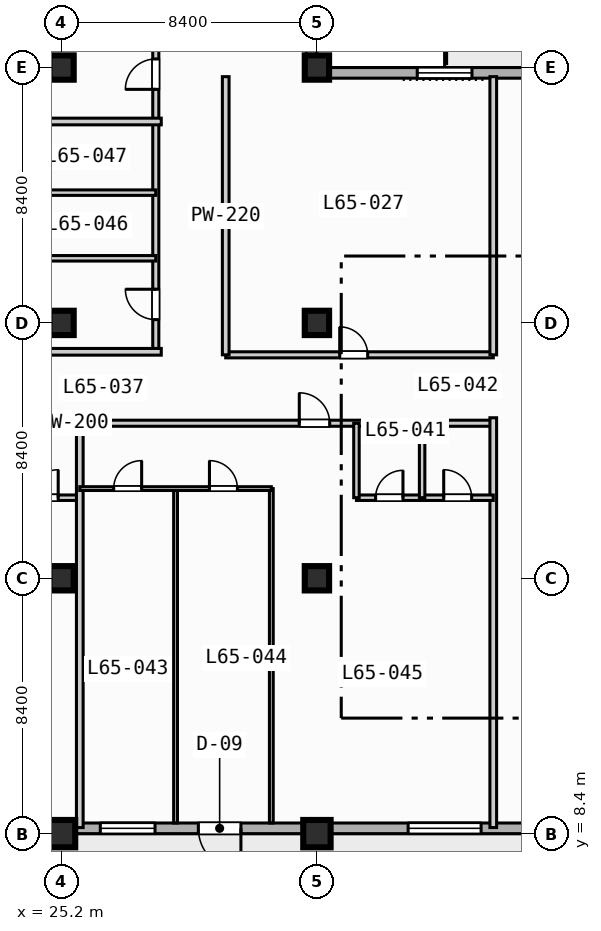
"""IFC4 building model, lengths in metres.
Left out: names, types, materials, properties, quantities, classifications, styles, units other than length and angle.
Written with IfcOpenShell. Run it as: python <this file> out.ifc"""

import sys

from ifc_helpers import new_model, si_unit, direction, frame, frame_2d, origin, origin_2d, place, context, subcontext, project, spatial, rectangle, extrude, element, fill, save


model = new_model("IFC4")
c1 = context("Model", 3, precision=1e-05, world=origin(), true_north=direction((0.0, 1.0)))
c2 = subcontext(c1, "Body", "Model", "MODEL_VIEW")
j1 = project(units=[si_unit("LENGTHUNIT", "METRE"), si_unit("PLANEANGLEUNIT", "RADIAN")], contexts=[c1])
p1 = place(None, origin())
s1 = spatial("IfcSite", under=j1, at=p1, CompositionType="ELEMENT")
p2 = place(p1, origin())
s2 = spatial("IfcBuilding", under=s1, at=p2, CompositionType="ELEMENT")
p3 = place(p2, frame((0.0, 0.0, 263.8)))
s3 = spatial("IfcBuildingStorey", under=s2, at=p3, CompositionType="ELEMENT", Elevation=263.8)
p4 = place(p3, frame((25.2, 8.4, 0.0), z_axis=(0.0, 0.0, 1.0), x_axis=(1.0, 0.0, 0.0)))
e1 = element("IfcColumn", 1, at=p4, inside=s3, PredefinedType="COLUMN", context=c2, shape_type="SweptSolid", body=[
    extrude(rectangle(XDim=0.9, YDim=0.9, at=origin_2d()), origin(), (0.0, 0.0, 1.0), 3.7),
])
for number, where, z_axis, x_axis in (
    (2, (25.2, 16.8, 0.0), (0.0, 0.0, 1.0), (1.0, 0.0, 0.0)),
    (3, (25.2, 25.2, 0.0), (0.0, 0.0, 1.0), (1.0, 0.0, 0.0)),
    (4, (25.2, 33.6, 0.0), (0.0, 0.0, 1.0), (1.0, 0.0, 0.0)),
):
    element("IfcColumn", number, at=place(p3, frame(where, z_axis=z_axis, x_axis=x_axis)), inside=s3, PredefinedType="COLUMN", context=c2, shape_type="SweptSolid", body=[
        extrude(rectangle(XDim=0.8, YDim=0.8, at=origin_2d()), origin(), (0.0, 0.0, 1.0), 3.7),
    ])
p5 = place(p3, frame((33.6, 8.4, 0.0), z_axis=(0.0, 0.0, 1.0), x_axis=(1.0, 0.0, 0.0)))
e5 = element("IfcColumn", 5, at=p5, inside=s3, PredefinedType="COLUMN", context=c2, shape_type="SweptSolid", body=[
    extrude(rectangle(XDim=0.9, YDim=0.9, at=origin_2d()), origin(), (0.0, 0.0, 1.0), 3.7),
])
for number, where, z_axis, x_axis in (
    (6, (33.6, 16.8, 0.0), (0.0, 0.0, 1.0), (1.0, 0.0, 0.0)),
    (7, (33.6, 25.2, 0.0), (0.0, 0.0, 1.0), (1.0, 0.0, 0.0)),
    (8, (33.6, 33.6, 0.0), (0.0, 0.0, 1.0), (1.0, 0.0, 0.0)),
):
    element("IfcColumn", number, at=place(p3, frame(where, z_axis=z_axis, x_axis=x_axis)), inside=s3, PredefinedType="COLUMN", context=c2, shape_type="SweptSolid", body=[
        extrude(rectangle(XDim=0.8, YDim=0.8, at=origin_2d()), origin(), (0.0, 0.0, 1.0), 3.7),
    ])
p6 = place(p3, frame((33.425, 72.425, 0.0), z_axis=(0.0, 0.0, 1.0), x_axis=(0.0, -1.0, 0.0)))
e9 = element("IfcWall", 9, at=p6, inside=s3, PredefinedType="STANDARD", context=c2, shape_type="SweptSolid", body=[
    extrude(rectangle(XDim=39.0, YDim=0.35, at=frame_2d((19.5, 0.0))), origin(), (0.0, 0.0, 1.0), 3.47),
])
p7 = place(p6, frame((5.9, 0.0, 0.85)))
e10 = element("IfcOpeningElement", 10, at=p7, cuts=e9, PredefinedType="OPENING", context=c2, shape_type="SweptSolid", body=[
    extrude(rectangle(XDim=1.8, YDim=1.8, at=frame_2d((0.9, 0.9))), frame((0.0, 0.185, 0.0), z_axis=(0.0, -1.0, 0.0), x_axis=(1.0, 0.0, 0.0)), (0.0, 0.0, 1.0), 0.37),
])
p8 = place(p3, frame((33.425, 33.425, 0.0), z_axis=(0.0, 0.0, 1.0), x_axis=(1.0, 0.0, 0.0)))
e11 = element("IfcWall", 11, at=p8, inside=s3, PredefinedType="STANDARD", context=c2, shape_type="SweptSolid", body=[
    extrude(rectangle(XDim=39.0, YDim=0.35, at=frame_2d((19.5, 0.0))), origin(), (0.0, 0.0, 1.0), 3.47),
])
p9 = place(p8, frame((12.075, 0.0, 0.0)))
e12 = element("IfcOpeningElement", 12, at=p9, cuts=e11, PredefinedType="OPENING", context=c2, shape_type="SweptSolid", body=[
    extrude(rectangle(XDim=1.4, YDim=2.2, at=frame_2d((0.7, 1.1))), frame((0.0, 0.185, 0.0), z_axis=(0.0, -1.0, 0.0), x_axis=(1.0, 0.0, 0.0)), (0.0, 0.0, 1.0), 0.37),
])
p10 = place(p8, frame((3.475, 0.0, 0.85)))
e13 = element("IfcOpeningElement", 13, at=p10, cuts=e11, PredefinedType="OPENING", context=c2, shape_type="SweptSolid", body=[
    extrude(rectangle(XDim=1.8, YDim=1.8, at=frame_2d((0.9, 0.9))), frame((0.0, 0.185, 0.0), z_axis=(0.0, -1.0, 0.0), x_axis=(1.0, 0.0, 0.0)), (0.0, 0.0, 1.0), 0.37),
])
p11 = place(p3, frame((72.425, 8.575, 0.0), z_axis=(0.0, 0.0, 1.0), x_axis=(-1.0, 0.0, 0.0)))
e14 = element("IfcWall", 14, at=p11, inside=s3, PredefinedType="STANDARD", context=c2, shape_type="SweptSolid", body=[
    extrude(rectangle(XDim=60.85, YDim=0.35, at=frame_2d((30.425, 0.0))), origin(), (0.0, 0.0, 1.0), 3.47),
])
p12 = place(p11, frame((41.325, 0.0, 0.0)))
e15 = element("IfcOpeningElement", 15, at=p12, cuts=e14, PredefinedType="OPENING", context=c2, shape_type="SweptSolid", body=[
    extrude(rectangle(XDim=1.4, YDim=2.2, at=frame_2d((0.7, 1.1))), frame((0.0, 0.185, 0.0), z_axis=(0.0, -1.0, 0.0), x_axis=(1.0, 0.0, 0.0)), (0.0, 0.0, 1.0), 0.37),
])
p13 = place(p11, frame((50.225, 0.0, 0.85)))
e16 = element("IfcOpeningElement", 16, at=p13, cuts=e14, PredefinedType="OPENING", context=c2, shape_type="SweptSolid", body=[
    extrude(rectangle(XDim=2.4, YDim=1.95, at=frame_2d((1.2, 0.975))), frame((0.0, 0.185, 0.0), z_axis=(0.0, -1.0, 0.0), x_axis=(1.0, 0.0, 0.0)), (0.0, 0.0, 1.0), 0.37),
])
p14 = place(p11, frame((33.425, 0.0, 0.85)))
e17 = element("IfcOpeningElement", 17, at=p14, cuts=e14, PredefinedType="OPENING", context=c2, shape_type="SweptSolid", body=[
    extrude(rectangle(XDim=2.4, YDim=1.95, at=frame_2d((1.2, 0.975))), frame((0.0, 0.185, 0.0), z_axis=(0.0, -1.0, 0.0), x_axis=(1.0, 0.0, 0.0)), (0.0, 0.0, 1.0), 0.37),
])
p15 = place(p11, frame((25.325, 0.0, 0.85)))
e18 = element("IfcOpeningElement", 18, at=p15, cuts=e14, PredefinedType="OPENING", context=c2, shape_type="SweptSolid", body=[
    extrude(rectangle(XDim=1.8, YDim=1.8, at=frame_2d((0.9, 0.9))), frame((0.0, 0.185, 0.0), z_axis=(0.0, -1.0, 0.0), x_axis=(1.0, 0.0, 0.0)), (0.0, 0.0, 1.0), 0.37),
])
p16 = place(p11, frame((58.15, 0.0, 0.85)))
e19 = element("IfcOpeningElement", 19, at=p16, cuts=e14, PredefinedType="OPENING", context=c2, shape_type="SweptSolid", body=[
    extrude(rectangle(XDim=1.8, YDim=1.8, at=frame_2d((0.9, 0.9))), frame((0.0, 0.185, 0.0), z_axis=(0.0, -1.0, 0.0), x_axis=(1.0, 0.0, 0.0)), (0.0, 0.0, 1.0), 0.37),
])
p17 = place(p11, frame((56.29, 0.0, 0.85)))
e20 = element("IfcOpeningElement", 20, at=p17, cuts=e14, PredefinedType="OPENING", context=c2, shape_type="SweptSolid", body=[
    extrude(rectangle(XDim=0.72, YDim=1.8, at=frame_2d((0.36, 0.9))), frame((0.0, 0.185, 0.0), z_axis=(0.0, -1.0, 0.0), x_axis=(1.0, 0.0, 0.0)), (0.0, 0.0, 1.0), 0.37),
])
p18 = place(p11, frame((44.15, 0.0, 0.85)))
e21 = element("IfcOpeningElement", 21, at=p18, cuts=e14, PredefinedType="OPENING", context=c2, shape_type="SweptSolid", body=[
    extrude(rectangle(XDim=1.8, YDim=1.8, at=frame_2d((0.9, 0.9))), frame((0.0, 0.185, 0.0), z_axis=(0.0, -1.0, 0.0), x_axis=(1.0, 0.0, 0.0)), (0.0, 0.0, 1.0), 0.37),
])
p19 = place(p3, frame((30.6, 24.15, 0.0), z_axis=(0.0, 0.0, 1.0), x_axis=(1.0, 0.0, 0.0)))
e22 = element("IfcWall", 22, at=p19, inside=s3, PredefinedType="PARTITIONING", context=c2, shape_type="SweptSolid", body=[
    extrude(rectangle(XDim=8.8, YDim=0.2, at=frame_2d((4.4, 0.0))), origin(), (0.0, 0.0, 1.0), 3.47),
])
p20 = place(p19, frame((3.75, 0.0, 0.0)))
e23 = element("IfcOpeningElement", 23, at=p20, cuts=e22, PredefinedType="OPENING", context=c2, shape_type="SweptSolid", body=[
    extrude(rectangle(XDim=0.92, YDim=2.1, at=frame_2d((0.46, 1.05))), frame((0.0, 0.11, 0.0), z_axis=(0.0, -1.0, 0.0), x_axis=(1.0, 0.0, 0.0)), (0.0, 0.0, 1.0), 0.22),
])
for number, where, z_axis, x_axis in (
    (24, (30.6, 24.15, 0.0), (0.0, 0.0, 1.0), (0.0, 1.0, 0.0)),
    (25, (39.4, 24.15, 0.0), (0.0, 0.0, 1.0), (0.0, 1.0, 0.0)),
):
    element("IfcWall", number, at=place(p3, frame(where, z_axis=z_axis, x_axis=x_axis)), inside=s3, PredefinedType="PARTITIONING", context=c2, shape_type="SweptSolid", body=[
        extrude(rectangle(XDim=9.15, YDim=0.22, at=frame_2d((4.575, 0.0))), origin(), (0.0, 0.0, 1.0), 3.47),
    ])
p21 = place(p3, frame((11.8, 21.9, 0.0), z_axis=(0.0, 0.0, 1.0), x_axis=(1.0, 0.0, 0.0)))
e26 = element("IfcWall", 26, at=p21, inside=s3, PredefinedType="PARTITIONING", context=c2, shape_type="SweptSolid", body=[
    extrude(rectangle(XDim=27.6, YDim=0.2, at=frame_2d((13.8, 0.0))), origin(), (0.0, 0.0, 1.0), 3.47),
])
p22 = place(p21, frame((7.42, 0.0, 0.0)))
e27 = element("IfcOpeningElement", 27, at=p22, cuts=e26, PredefinedType="OPENING", context=c2, shape_type="SweptSolid", body=[
    extrude(rectangle(XDim=1.0, YDim=2.15, at=frame_2d((0.5, 1.075))), frame((0.0, 0.11, 0.0), z_axis=(0.0, -1.0, 0.0), x_axis=(1.0, 0.0, 0.0)), (0.0, 0.0, 1.0), 0.22),
])
p23 = place(p21, frame((21.22, 0.0, 0.0)))
e28 = element("IfcOpeningElement", 28, at=p23, cuts=e26, PredefinedType="OPENING", context=c2, shape_type="SweptSolid", body=[
    extrude(rectangle(XDim=1.0, YDim=2.15, at=frame_2d((0.5, 1.075))), frame((0.0, 0.11, 0.0), z_axis=(0.0, -1.0, 0.0), x_axis=(1.0, 0.0, 0.0)), (0.0, 0.0, 1.0), 0.22),
])
p24 = place(p3, frame((21.3, 19.45, 0.0), z_axis=(0.0, 0.0, 1.0), x_axis=(1.0, 0.0, 0.0)))
e29 = element("IfcWall", 29, at=p24, inside=s3, PredefinedType="PLUMBINGWALL", context=c2, shape_type="SweptSolid", body=[
    extrude(rectangle(XDim=4.5, YDim=0.18, at=frame_2d((2.25, 0.0))), origin(), (0.0, 0.0, 1.0), 3.47),
])
p25 = place(p24, frame((0.63, 0.0, 0.0)))
e30 = element("IfcOpeningElement", 30, at=p25, cuts=e29, PredefinedType="OPENING", context=c2, shape_type="SweptSolid", body=[
    extrude(rectangle(XDim=0.9, YDim=2.1, at=frame_2d((0.45, 1.05))), frame((0.0, 0.1, 0.0), z_axis=(0.0, -1.0, 0.0), x_axis=(1.0, 0.0, 0.0)), (0.0, 0.0, 1.0), 0.2),
])
p26 = place(p24, frame((2.87, 0.0, 0.0)))
e31 = element("IfcOpeningElement", 31, at=p26, cuts=e29, PredefinedType="OPENING", context=c2, shape_type="SweptSolid", body=[
    extrude(rectangle(XDim=0.92, YDim=2.1, at=frame_2d((0.46, 1.05))), frame((0.0, 0.1, 0.0), z_axis=(0.0, -1.0, 0.0), x_axis=(1.0, 0.0, 0.0)), (0.0, 0.0, 1.0), 0.2),
])
for number, where, z_axis, x_axis in (
    (32, (25.8, 8.6, 0.0), (0.0, 0.0, 1.0), (0.0, 1.0, 0.0)),
    (33, (39.4, 8.6, 0.0), (0.0, 0.0, 1.0), (0.0, 1.0, 0.0)),
):
    element("IfcWall", number, at=place(p3, frame(where, z_axis=z_axis, x_axis=x_axis)), inside=s3, PredefinedType="PARTITIONING", context=c2, shape_type="SweptSolid", body=[
        extrude(rectangle(XDim=13.48, YDim=0.22, at=frame_2d((6.74, 0.0))), origin(), (0.0, 0.0, 1.0), 3.47),
    ])
p27 = place(p3, frame((34.9, 19.45, 0.0), z_axis=(0.0, 0.0, 1.0), x_axis=(1.0, 0.0, 0.0)))
e34 = element("IfcWall", 34, at=p27, inside=s3, PredefinedType="PLUMBINGWALL", context=c2, shape_type="SweptSolid", body=[
    extrude(rectangle(XDim=4.5, YDim=0.18, at=frame_2d((2.25, 0.0))), origin(), (0.0, 0.0, 1.0), 3.47),
])
p28 = place(p27, frame((0.63, 0.0, 0.0)))
e35 = element("IfcOpeningElement", 35, at=p28, cuts=e34, PredefinedType="OPENING", context=c2, shape_type="SweptSolid", body=[
    extrude(rectangle(XDim=0.9, YDim=2.1, at=frame_2d((0.45, 1.05))), frame((0.0, 0.1, 0.0), z_axis=(0.0, -1.0, 0.0), x_axis=(1.0, 0.0, 0.0)), (0.0, 0.0, 1.0), 0.2),
])
p29 = place(p27, frame((2.87, 0.0, 0.0)))
e36 = element("IfcOpeningElement", 36, at=p29, cuts=e34, PredefinedType="OPENING", context=c2, shape_type="SweptSolid", body=[
    extrude(rectangle(XDim=0.92, YDim=2.1, at=frame_2d((0.46, 1.05))), frame((0.0, 0.1, 0.0), z_axis=(0.0, -1.0, 0.0), x_axis=(1.0, 0.0, 0.0)), (0.0, 0.0, 1.0), 0.2),
])
for number, where, z_axis, x_axis in (
    (37, (34.9, 19.45, 0.0), (0.0, 0.0, 1.0), (0.0, 1.0, 0.0)),
    (38, (37.06, 19.45, 0.0), (0.0, 0.0, 1.0), (0.0, 1.0, 0.0)),
):
    element("IfcWall", number, at=place(p3, frame(where, z_axis=z_axis, x_axis=x_axis)), inside=s3, PredefinedType="PLUMBINGWALL", context=c2, shape_type="SweptSolid", body=[
        extrude(rectangle(XDim=2.45, YDim=0.18, at=frame_2d((1.225, 0.0))), origin(), (0.0, 0.0, 1.0), 3.47),
    ])
for number, where, z_axis, x_axis in (
    (39, (28.95, 8.75, 0.0), (0.0, 0.0, 1.0), (0.0, 1.0, 0.0)),
    (40, (32.1, 8.75, 0.0), (0.0, 0.0, 1.0), (0.0, 1.0, 0.0)),
):
    element("IfcWall", number, at=place(p3, frame(where, z_axis=z_axis, x_axis=x_axis)), inside=s3, PredefinedType="PARTITIONING", context=c2, shape_type="SweptSolid", body=[
        extrude(rectangle(XDim=11.0, YDim=0.125, at=frame_2d((5.5, 0.0))), origin(), (0.0, 0.0, 1.0), 3.47),
    ])
p30 = place(p3, frame((25.8, 19.75, 0.0), z_axis=(0.0, 0.0, 1.0), x_axis=(1.0, 0.0, 0.0)))
e41 = element("IfcWall", 41, at=p30, inside=s3, PredefinedType="PARTITIONING", context=c2, shape_type="SweptSolid", body=[
    extrude(rectangle(XDim=6.3, YDim=0.125, at=frame_2d((3.15, 0.0))), origin(), (0.0, 0.0, 1.0), 3.47),
])
p31 = place(p30, frame((1.115, 0.0, 0.0)))
e42 = element("IfcOpeningElement", 42, at=p31, cuts=e41, PredefinedType="OPENING", context=c2, shape_type="SweptSolid", body=[
    extrude(rectangle(XDim=0.92, YDim=2.1, at=frame_2d((0.46, 1.05))), frame((0.0, 0.073, 0.0), z_axis=(0.0, -1.0, 0.0), x_axis=(1.0, 0.0, 0.0)), (0.0, 0.0, 1.0), 0.145),
])
p32 = place(p30, frame((4.265, 0.0, 0.0)))
e43 = element("IfcOpeningElement", 43, at=p32, cuts=e41, PredefinedType="OPENING", context=c2, shape_type="SweptSolid", body=[
    extrude(rectangle(XDim=0.92, YDim=2.1, at=frame_2d((0.46, 1.05))), frame((0.0, 0.073, 0.0), z_axis=(0.0, -1.0, 0.0), x_axis=(1.0, 0.0, 0.0)), (0.0, 0.0, 1.0), 0.145),
])
p33 = place(p3, frame((28.3, 24.25, 0.0), z_axis=(0.0, 0.0, 1.0), x_axis=(0.0, 1.0, 0.0)))
e44 = element("IfcWall", 44, at=p33, inside=s3, PredefinedType="PARTITIONING", context=c2, shape_type="SweptSolid", body=[
    extrude(rectangle(XDim=15.15, YDim=0.2, at=frame_2d((7.575, 0.0))), origin(), (0.0, 0.0, 1.0), 3.47),
])
p34 = place(p33, frame((1.058, 0.0, 0.0)))
e45 = element("IfcOpeningElement", 45, at=p34, cuts=e44, PredefinedType="OPENING", context=c2, shape_type="SweptSolid", body=[
    extrude(rectangle(XDim=1.0, YDim=2.15, at=frame_2d((0.5, 1.075))), frame((0.0, 0.11, 0.0), z_axis=(0.0, -1.0, 0.0), x_axis=(1.0, 0.0, 0.0)), (0.0, 0.0, 1.0), 0.22),
])
p35 = place(p33, frame((8.633, 0.0, 0.0)))
e46 = element("IfcOpeningElement", 46, at=p35, cuts=e44, PredefinedType="OPENING", context=c2, shape_type="SweptSolid", body=[
    extrude(rectangle(XDim=1.0, YDim=2.15, at=frame_2d((0.5, 1.075))), frame((0.0, 0.11, 0.0), z_axis=(0.0, -1.0, 0.0), x_axis=(1.0, 0.0, 0.0)), (0.0, 0.0, 1.0), 0.22),
])
p36 = place(p3, frame((8.6, 24.25, 0.0), z_axis=(0.0, 0.0, 1.0), x_axis=(1.0, 0.0, 0.0)))
e47 = element("IfcWall", 47, at=p36, inside=s3, PredefinedType="PARTITIONING", context=c2, shape_type="SweptSolid", body=[
    extrude(rectangle(XDim=19.88, YDim=0.22, at=frame_2d((9.94, 0.0))), origin(), (0.0, 0.0, 1.0), 3.47),
])
for number, where, z_axis, x_axis in (
    (48, (23.15, 27.325, 0.0), (0.0, 0.0, 1.0), (1.0, 0.0, 0.0)),
    (49, (23.15, 29.485, 0.0), (0.0, 0.0, 1.0), (1.0, 0.0, 0.0)),
):
    element("IfcWall", number, at=place(p3, frame(where, z_axis=z_axis, x_axis=x_axis)), inside=s3, PredefinedType="PLUMBINGWALL", context=c2, shape_type="SweptSolid", body=[
        extrude(rectangle(XDim=5.15, YDim=0.18, at=frame_2d((2.575, 0.0))), origin(), (0.0, 0.0, 1.0), 3.47),
    ])
p37 = place(p3, frame((8.6, 31.825, 0.0), z_axis=(0.0, 0.0, 1.0), x_axis=(1.0, 0.0, 0.0)))
e50 = element("IfcWall", 50, at=p37, inside=s3, PredefinedType="PARTITIONING", context=c2, shape_type="SweptSolid", body=[
    extrude(rectangle(XDim=19.88, YDim=0.22, at=frame_2d((9.94, 0.0))), origin(), (0.0, 0.0, 1.0), 3.47),
])
p38 = place(p10, origin())
e51 = element("IfcWindow", 51, at=p38, inside=s3, PartitioningType="SINGLE_PANEL", PredefinedType="WINDOW", context=c2, shape_type="SweptSolid", body=[
    extrude(rectangle(XDim=1.8, YDim=1.8, at=frame_2d((0.9, 0.9))), frame((0.0, 0.03, 0.0), z_axis=(0.0, -1.0, 0.0), x_axis=(1.0, 0.0, 0.0)), (0.0, 0.0, 1.0), 0.06),
])
fill(e13, e51)
p39 = place(p12, origin())
e52 = element("IfcDoor", 52, at=p39, inside=s3, OperationType="SINGLE_SWING_LEFT", PredefinedType="DOOR", context=c2, shape_type="SweptSolid", body=[
    extrude(rectangle(XDim=1.4, YDim=2.2, at=frame_2d((0.7, 1.1))), frame((0.0, 0.025, 0.0), z_axis=(0.0, -1.0, 0.0), x_axis=(1.0, 0.0, 0.0)), (0.0, 0.0, 1.0), 0.05),
])
fill(e15, e52)
p40 = place(p14, origin())
e53 = element("IfcWindow", 53, at=p40, inside=s3, PartitioningType="SINGLE_PANEL", PredefinedType="WINDOW", context=c2, shape_type="SweptSolid", body=[
    extrude(rectangle(XDim=2.4, YDim=1.95, at=frame_2d((1.2, 0.975))), frame((0.0, 0.03, 0.0), z_axis=(0.0, -1.0, 0.0), x_axis=(1.0, 0.0, 0.0)), (0.0, 0.0, 1.0), 0.06),
])
fill(e17, e53)
p41 = place(p18, origin())
e54 = element("IfcWindow", 54, at=p41, inside=s3, PartitioningType="SINGLE_PANEL", PredefinedType="WINDOW", context=c2, shape_type="SweptSolid", body=[
    extrude(rectangle(XDim=1.8, YDim=1.8, at=frame_2d((0.9, 0.9))), frame((0.0, 0.03, 0.0), z_axis=(0.0, -1.0, 0.0), x_axis=(1.0, 0.0, 0.0)), (0.0, 0.0, 1.0), 0.06),
])
fill(e21, e54)
p42 = place(p20, origin())
e55 = element("IfcDoor", 55, at=p42, inside=s3, OperationType="SINGLE_SWING_LEFT", PredefinedType="DOOR", context=c2, shape_type="SweptSolid", body=[
    extrude(rectangle(XDim=0.92, YDim=2.1, at=frame_2d((0.46, 1.05))), frame((0.0, 0.025, 0.0), z_axis=(0.0, -1.0, 0.0), x_axis=(1.0, 0.0, 0.0)), (0.0, 0.0, 1.0), 0.05),
])
fill(e23, e55)
p43 = place(p23, origin())
e56 = element("IfcDoor", 56, at=p43, inside=s3, OperationType="SINGLE_SWING_LEFT", PredefinedType="DOOR", context=c2, shape_type="SweptSolid", body=[
    extrude(rectangle(XDim=1.0, YDim=2.15, at=frame_2d((0.5, 1.075))), frame((0.0, 0.025, 0.0), z_axis=(0.0, -1.0, 0.0), x_axis=(1.0, 0.0, 0.0)), (0.0, 0.0, 1.0), 0.05),
])
fill(e28, e56)
p44 = place(p26, origin())
e57 = element("IfcDoor", 57, at=p44, inside=s3, OperationType="SINGLE_SWING_RIGHT", PredefinedType="DOOR", context=c2, shape_type="SweptSolid", body=[
    extrude(rectangle(XDim=0.92, YDim=2.1, at=frame_2d((0.46, 1.05))), frame((0.0, 0.025, 0.0), z_axis=(0.0, -1.0, 0.0), x_axis=(1.0, 0.0, 0.0)), (0.0, 0.0, 1.0), 0.05),
])
fill(e31, e57)
p45 = place(p28, origin())
e58 = element("IfcDoor", 58, at=p45, inside=s3, OperationType="SINGLE_SWING_RIGHT", PredefinedType="DOOR", context=c2, shape_type="SweptSolid", body=[
    extrude(rectangle(XDim=0.9, YDim=2.1, at=frame_2d((0.45, 1.05))), frame((0.0, 0.025, 0.0), z_axis=(0.0, -1.0, 0.0), x_axis=(1.0, 0.0, 0.0)), (0.0, 0.0, 1.0), 0.05),
])
fill(e35, e58)
p46 = place(p29, origin())
e59 = element("IfcDoor", 59, at=p46, inside=s3, OperationType="SINGLE_SWING_LEFT", PredefinedType="DOOR", context=c2, shape_type="SweptSolid", body=[
    extrude(rectangle(XDim=0.92, YDim=2.1, at=frame_2d((0.46, 1.05))), frame((0.0, 0.025, 0.0), z_axis=(0.0, -1.0, 0.0), x_axis=(1.0, 0.0, 0.0)), (0.0, 0.0, 1.0), 0.05),
])
fill(e36, e59)
p47 = place(p31, origin())
e60 = element("IfcDoor", 60, at=p47, inside=s3, OperationType="SINGLE_SWING_RIGHT", PredefinedType="DOOR", context=c2, shape_type="SweptSolid", body=[
    extrude(rectangle(XDim=0.92, YDim=2.1, at=frame_2d((0.46, 1.05))), frame((0.0, 0.025, 0.0), z_axis=(0.0, -1.0, 0.0), x_axis=(1.0, 0.0, 0.0)), (0.0, 0.0, 1.0), 0.05),
])
fill(e42, e60)
p48 = place(p32, origin())
e61 = element("IfcDoor", 61, at=p48, inside=s3, OperationType="SINGLE_SWING_LEFT", PredefinedType="DOOR", context=c2, shape_type="SweptSolid", body=[
    extrude(rectangle(XDim=0.92, YDim=2.1, at=frame_2d((0.46, 1.05))), frame((0.0, 0.025, 0.0), z_axis=(0.0, -1.0, 0.0), x_axis=(1.0, 0.0, 0.0)), (0.0, 0.0, 1.0), 0.05),
])
fill(e43, e61)
p49 = place(p34, origin())
e62 = element("IfcDoor", 62, at=p49, inside=s3, OperationType="SINGLE_SWING_RIGHT", PredefinedType="DOOR", context=c2, shape_type="SweptSolid", body=[
    extrude(rectangle(XDim=1.0, YDim=2.15, at=frame_2d((0.5, 1.075))), frame((0.0, 0.025, 0.0), z_axis=(0.0, -1.0, 0.0), x_axis=(1.0, 0.0, 0.0)), (0.0, 0.0, 1.0), 0.05),
])
fill(e45, e62)
p50 = place(p35, origin())
e63 = element("IfcDoor", 63, at=p50, inside=s3, OperationType="SINGLE_SWING_LEFT", PredefinedType="DOOR", context=c2, shape_type="SweptSolid", body=[
    extrude(rectangle(XDim=1.0, YDim=2.15, at=frame_2d((0.5, 1.075))), frame((0.0, 0.025, 0.0), z_axis=(0.0, -1.0, 0.0), x_axis=(1.0, 0.0, 0.0)), (0.0, 0.0, 1.0), 0.05),
])
fill(e46, e63)
save(model, sys.argv[1])
